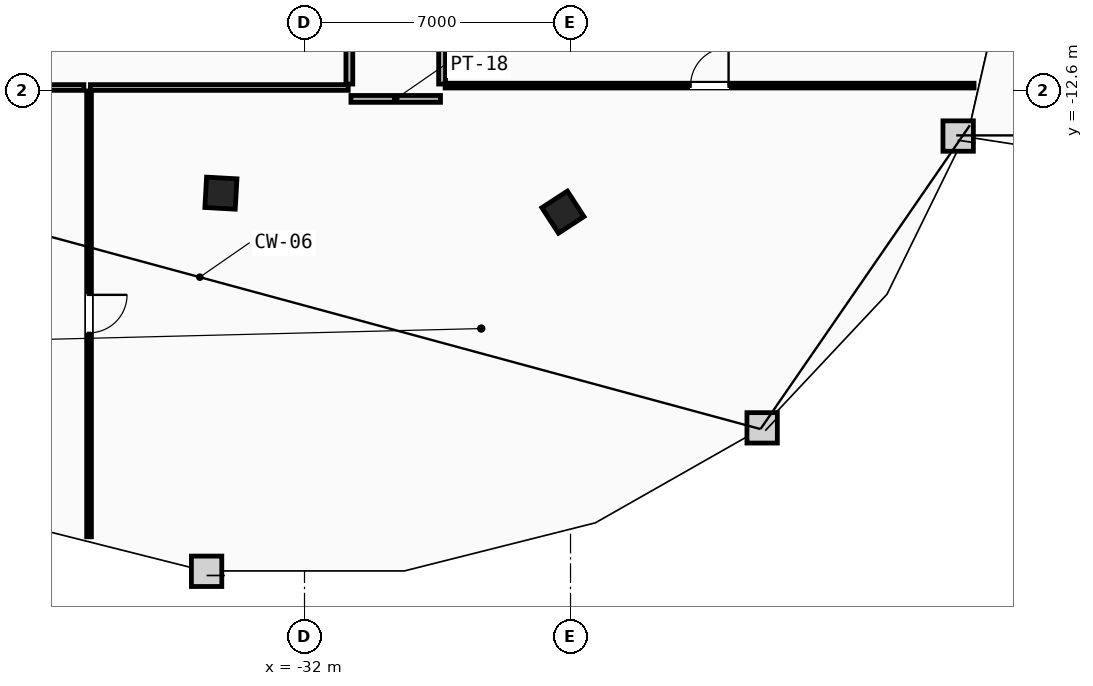
"""IFC4 building model, lengths in metres.
Left out: names, types, materials, properties, quantities, classifications, styles, units other than length and angle.
Written with IfcOpenShell. Run it as: python <this file> out.ifc"""

import sys

from ifc_helpers import new_model, si_unit, direction, frame, frame_2d, origin, origin_2d, place, context, subcontext, project, spatial, rectangle, extrude, element, fill, save


model = new_model("IFC4")
c1 = context("Model", 3, precision=1e-05, world=origin(), true_north=direction((0.0, 1.0)))
c2 = subcontext(c1, "Body", "Model", "MODEL_VIEW")
j1 = project(units=[si_unit("LENGTHUNIT", "METRE"), si_unit("PLANEANGLEUNIT", "RADIAN")], contexts=[c1])
p1 = place(None, origin())
s1 = spatial("IfcSite", under=j1, at=p1, CompositionType="ELEMENT")
p2 = place(p1, origin())
s2 = spatial("IfcBuilding", under=s1, at=p2, CompositionType="ELEMENT")
p3 = place(p2, frame((0.0, 0.0, 250.4)))
s3 = spatial("IfcBuildingStorey", under=s2, at=p3, CompositionType="ELEMENT", Elevation=250.4)
for number, where, z_axis, x_axis in (
    (1, (-34.2, -15.3, 0.0), (0.0, 0.0, 1.0), (0.998, -0.055, 0.0)),
    (2, (-25.2, -15.8, 0.0), (0.0, 0.0, 1.0), (0.838, 0.546, 0.0)),
):
    element("IfcColumn", number, at=place(p3, frame(where, z_axis=z_axis, x_axis=x_axis)), inside=s3, PredefinedType="COLUMN", context=c2, shape_type="SweptSolid", body=[
        extrude(rectangle(XDim=0.8, YDim=0.8, at=origin_2d()), origin(), (0.0, 0.0, 1.0), 3.6),
    ])
p4 = place(p3, frame((-49.686, -12.52, 0.0), z_axis=(0.0, 0.0, 1.0), x_axis=(1.0, 0.0, 0.0)))
e3 = element("IfcWall", 3, at=p4, inside=s3, PredefinedType="PARTITIONING", context=c2, shape_type="SweptSolid", body=[
    extrude(rectangle(XDim=11.881, YDim=0.15, at=frame_2d((5.94, 0.0))), origin(), (0.0, 0.0, 1.0), 3.34),
])
p5 = place(p3, frame((-37.635, -12.52, 0.0), z_axis=(0.0, 0.0, 1.0), x_axis=(1.0, 0.0, 0.0)))
e4 = element("IfcWall", 4, at=p5, inside=s3, PredefinedType="PARTITIONING", context=c2, shape_type="SweptSolid", body=[
    extrude(rectangle(XDim=6.785, YDim=0.15, at=frame_2d((3.393, 0.0))), origin(), (0.0, 0.0, 1.0), 3.34),
])
p6 = place(p3, frame((-30.779, -12.82, 0.0), z_axis=(0.0, 0.0, 1.0), x_axis=(1.0, 0.0, 0.0)))
e5 = element("IfcWall", 5, at=p6, inside=s3, PredefinedType="PARTITIONING", context=c2, shape_type="SweptSolid", body=[
    extrude(rectangle(XDim=2.357, YDim=0.18, at=frame_2d((1.179, 0.0))), origin(), (0.0, 0.0, 1.0), 3.34),
])
p7 = place(p3, frame((-30.82, -6.07, 0.0), z_axis=(0.0, 0.0, 1.0), x_axis=(0.0, -1.0, 0.0)))
e6 = element("IfcWall", 6, at=p7, inside=s3, PredefinedType="PARTITIONING", context=c2, shape_type="SweptSolid", body=[
    extrude(rectangle(XDim=6.36, YDim=0.18, at=frame_2d((3.18, 0.0))), origin(), (0.0, 0.0, 1.0), 3.34),
])
p8 = place(p7, frame((2.68, 0.0, 0.0)))
e7 = element("IfcOpeningElement", 7, at=p8, cuts=e6, PredefinedType="OPENING", context=c2, shape_type="SweptSolid", body=[
    extrude(rectangle(XDim=1.0, YDim=2.15, at=frame_2d((0.5, 1.075))), frame((0.0, 0.1, 0.0), z_axis=(0.0, -1.0, 0.0), x_axis=(1.0, 0.0, 0.0)), (0.0, 0.0, 1.0), 0.2),
])
p9 = place(p3, frame((-28.38, -12.43, 0.0), z_axis=(0.0, 0.0, 1.0), x_axis=(0.0, 1.0, 0.0)))
e8 = element("IfcWall", 8, at=p9, inside=s3, PredefinedType="PARTITIONING", context=c2, shape_type="SweptSolid", body=[
    extrude(rectangle(XDim=6.36, YDim=0.18, at=frame_2d((3.18, 0.0))), origin(), (0.0, 0.0, 1.0), 3.34),
])
p10 = place(p9, frame((2.68, 0.0, 0.0)))
e9 = element("IfcOpeningElement", 9, at=p10, cuts=e8, PredefinedType="OPENING", context=c2, shape_type="SweptSolid", body=[
    extrude(rectangle(XDim=1.0, YDim=2.15, at=frame_2d((0.5, 1.075))), frame((0.0, 0.1, 0.0), z_axis=(0.0, -1.0, 0.0), x_axis=(1.0, 0.0, 0.0)), (0.0, 0.0, 1.0), 0.2),
])
p11 = place(p3, frame((-28.3, -12.47, 0.0), z_axis=(0.0, 0.0, 1.0), x_axis=(1.0, 0.0, 0.0)))
e10 = element("IfcWall", 10, at=p11, inside=s3, PredefinedType="PARTITIONING", context=c2, shape_type="SweptSolid", body=[
    extrude(rectangle(XDim=13.919, YDim=0.125, at=frame_2d((6.959, 0.0))), origin(), (0.0, 0.0, 1.0), 3.34),
])
p12 = place(p11, frame((6.459, 0.0, 0.0)))
e11 = element("IfcOpeningElement", 11, at=p12, cuts=e10, PredefinedType="OPENING", context=c2, shape_type="SweptSolid", body=[
    extrude(rectangle(XDim=1.0, YDim=2.15, at=frame_2d((0.5, 1.075))), frame((0.0, 0.073, 0.0), z_axis=(0.0, -1.0, 0.0), x_axis=(1.0, 0.0, 0.0)), (0.0, 0.0, 1.0), 0.145),
])
p13 = place(p3, frame((-37.67, -12.61, 0.0), z_axis=(0.0, 0.0, 1.0), x_axis=(0.0, -1.0, 0.0)))
e12 = element("IfcWall", 12, at=p13, inside=s3, PredefinedType="PARTITIONING", context=c2, shape_type="SweptSolid", body=[
    extrude(rectangle(XDim=11.731, YDim=0.125, at=frame_2d((5.866, 0.0))), origin(), (0.0, 0.0, 1.0), 3.34),
])
p14 = place(p13, frame((5.366, 0.0, 0.0)))
e13 = element("IfcOpeningElement", 13, at=p14, cuts=e12, PredefinedType="OPENING", context=c2, shape_type="SweptSolid", body=[
    extrude(rectangle(XDim=1.0, YDim=2.15, at=frame_2d((0.5, 1.075))), frame((0.0, 0.073, 0.0), z_axis=(0.0, -1.0, 0.0), x_axis=(1.0, 0.0, 0.0)), (0.0, 0.0, 1.0), 0.145),
])
p15 = place(p12, origin())
e14 = element("IfcDoor", 14, at=p15, inside=s3, OperationType="SINGLE_SWING_RIGHT", PredefinedType="DOOR", context=c2, shape_type="SweptSolid", body=[
    extrude(rectangle(XDim=1.0, YDim=2.15, at=frame_2d((0.5, 1.075))), frame((0.0, 0.025, 0.0), z_axis=(0.0, -1.0, 0.0), x_axis=(1.0, 0.0, 0.0)), (0.0, 0.0, 1.0), 0.05),
])
fill(e11, e14)
p16 = place(p14, origin())
e15 = element("IfcDoor", 15, at=p16, inside=s3, OperationType="SINGLE_SWING_LEFT", PredefinedType="DOOR", context=c2, shape_type="SweptSolid", body=[
    extrude(rectangle(XDim=1.0, YDim=2.15, at=frame_2d((0.5, 1.075))), frame((0.0, 0.025, 0.0), z_axis=(0.0, -1.0, 0.0), x_axis=(1.0, 0.0, 0.0)), (0.0, 0.0, 1.0), 0.05),
])
fill(e13, e15)
save(model, sys.argv[1])
